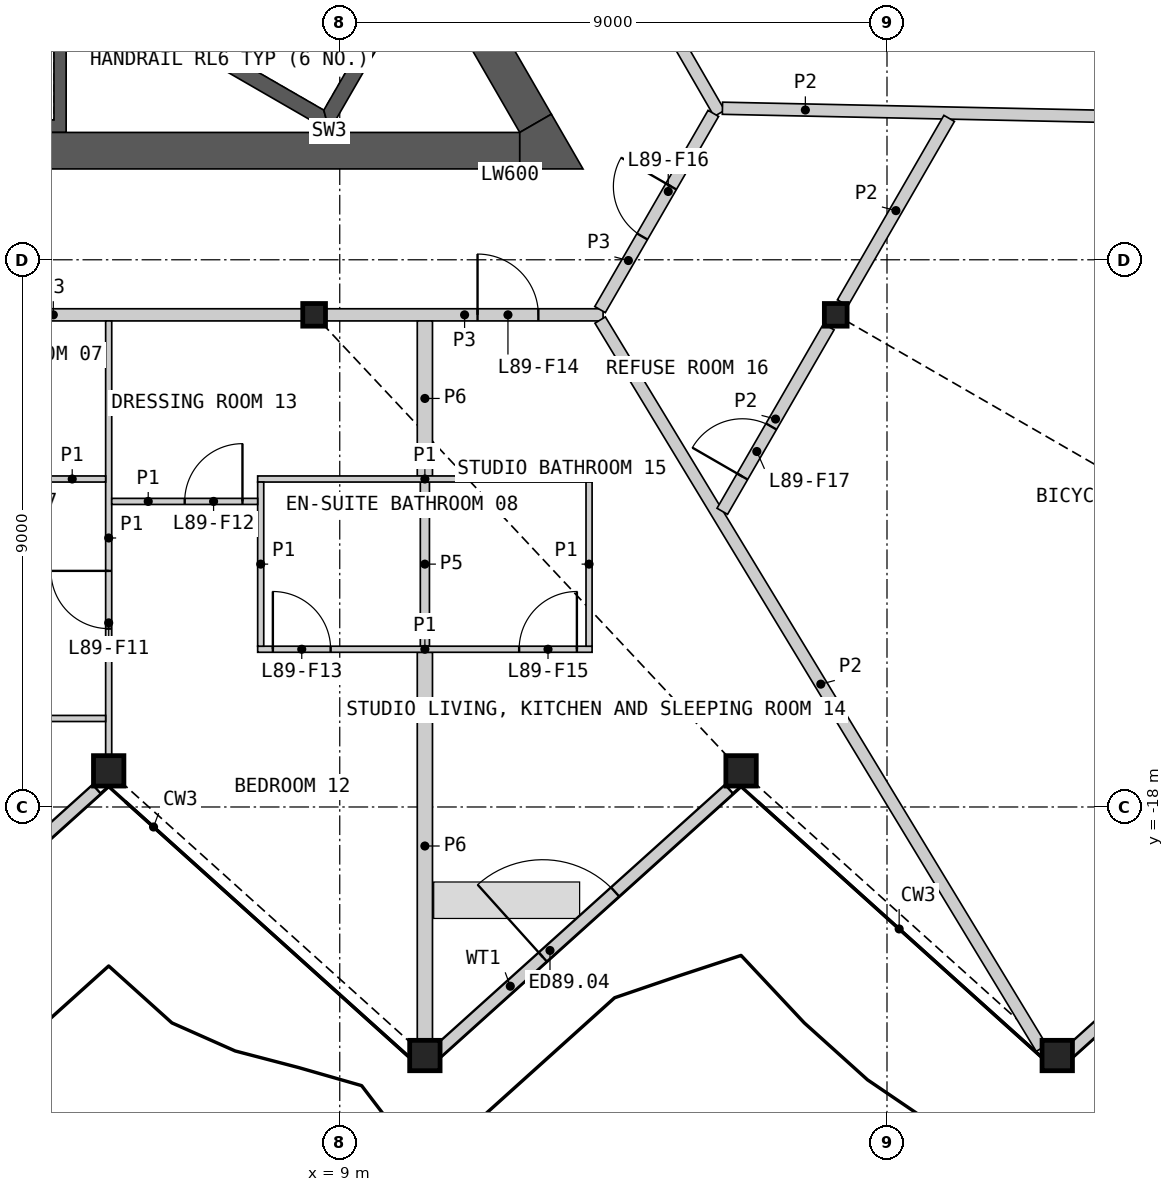
"""IFC4 building model, lengths in metres.
Left out: names, types, materials, properties, quantities, classifications, styles, units other than length and angle.
Written with IfcOpenShell. Run it as: python <this file> out.ifc"""

import sys

from ifc_helpers import new_model, si_unit, direction, frame, frame_2d, origin, origin_2d, place, context, subcontext, project, spatial, polyline, rectangle, hollow_rectangle, i_section, outline, extrude, element, fill, save


model = new_model("IFC4")
c1 = context("Model", 3, precision=1e-05, world=origin(), true_north=direction((0.0, 1.0)))
c2 = subcontext(c1, "Body", "Model", "MODEL_VIEW")
j1 = project(units=[si_unit("LENGTHUNIT", "METRE"), si_unit("PLANEANGLEUNIT", "RADIAN")], contexts=[c1])
p1 = place(None, origin())
s1 = spatial("IfcSite", under=j1, at=p1, CompositionType="ELEMENT")
p2 = place(p1, origin())
s2 = spatial("IfcBuilding", under=s1, at=p2, CompositionType="ELEMENT")
p3 = place(p2, frame((0.0, 0.0, 391.6)))
s3 = spatial("IfcBuildingStorey", under=s2, at=p3, CompositionType="ELEMENT", Elevation=391.6)
for number, where, z_axis, x_axis in (
    (1, (5.2, -17.406, 0.0), (0.0, 0.0, 1.0), (1.0, 0.0, 0.0)),
    (2, (10.4, -22.088, 0.0), (0.0, 0.0, 1.0), (1.0, 0.0, 0.0)),
    (3, (15.6, -17.406, 0.0), (0.0, 0.0, 1.0), (1.0, 0.0, 0.0)),
    (4, (20.8, -22.088, 0.0), (0.0, 0.0, 1.0), (1.0, 0.0, 0.0)),
):
    element("IfcColumn", number, at=place(p3, frame(where, z_axis=z_axis, x_axis=x_axis)), inside=s3, PredefinedType="COLUMN", context=c2, shape_type="SweptSolid", body=[
        extrude(hollow_rectangle(XDim=0.5, YDim=0.5, WallThickness=0.03, at=origin_2d()), origin(), (0.0, 0.0, 1.0), 3.4),
    ])
for number, where, z_axis, x_axis in (
    (5, (8.578, -9.906, 0.0), (0.0, 0.0, 1.0), (1.0, 0.0, 0.0)),
    (6, (17.157, -9.906, 0.0), (0.0, 0.0, 1.0), (1.0, 0.0, 0.0)),
):
    element("IfcColumn", number, at=place(p3, frame(where, z_axis=z_axis, x_axis=x_axis)), inside=s3, PredefinedType="COLUMN", context=c2, shape_type="SweptSolid", body=[
        extrude(i_section(OverallWidth=0.374, OverallDepth=0.372, WebThickness=0.016, FlangeThickness=0.026, at=origin_2d()), origin(), (0.0, 0.0, 1.0), 3.4),
    ])
p4 = place(p3, frame((0.205, -22.028, 0.0), z_axis=(0.0, 0.0, 1.0), x_axis=(0.743136196971, 0.669140189162, 0.0)))
e7 = element("IfcWall", 7, at=p4, inside=s3, PredefinedType="SOLIDWALL", context=c2, shape_type="SweptSolid", body=[
    extrude(rectangle(XDim=6.457, YDim=0.2, at=frame_2d((3.229, 0.0))), origin(), (0.0, 0.0, 1.0), 2.634),
])
p5 = place(p4, frame((2.333, 0.0, 0.0)))
e8 = element("IfcOpeningElement", 8, at=p5, cuts=e7, PredefinedType="OPENING", context=c2, shape_type="SweptSolid", body=[
    extrude(rectangle(XDim=1.6, YDim=2.25, at=frame_2d((0.8, 1.125))), frame((0.0, 0.11, 0.0), z_axis=(0.0, -1.0, 0.0), x_axis=(1.0, 0.0, 0.0)), (0.0, 0.0, 1.0), 0.22),
])
p6 = place(p3, frame((10.605, -22.028, 0.0), z_axis=(0.0, 0.0, 1.0), x_axis=(0.743153126052, 0.669121387522, 0.0)))
e9 = element("IfcWall", 9, at=p6, inside=s3, PredefinedType="SOLIDWALL", context=c2, shape_type="SweptSolid", body=[
    extrude(rectangle(XDim=6.457, YDim=0.2, at=frame_2d((3.229, 0.0))), origin(), (0.0, 0.0, 1.0), 2.634),
])
p7 = place(p6, frame((2.333, 0.0, 0.0)))
e10 = element("IfcOpeningElement", 10, at=p7, cuts=e9, PredefinedType="OPENING", context=c2, shape_type="SweptSolid", body=[
    extrude(rectangle(XDim=1.6, YDim=2.25, at=frame_2d((0.8, 1.125))), frame((0.0, 0.11, 0.0), z_axis=(0.0, -1.0, 0.0), x_axis=(1.0, 0.0, 0.0)), (0.0, 0.0, 1.0), 0.22),
])
p8 = place(p3, frame((21.005, -22.028, 0.0), z_axis=(0.0, 0.0, 1.0), x_axis=(0.743136196971, 0.669140189162, 0.0)))
e11 = element("IfcWall", 11, at=p8, inside=s3, PredefinedType="SOLIDWALL", context=c2, shape_type="SweptSolid", body=[
    extrude(rectangle(XDim=6.457, YDim=0.2, at=frame_2d((3.229, 0.0))), origin(), (0.0, 0.0, 1.0), 2.634),
])
p9 = place(p8, frame((2.333, 0.0, 0.0)))
e12 = element("IfcOpeningElement", 12, at=p9, cuts=e11, PredefinedType="OPENING", context=c2, shape_type="SweptSolid", body=[
    extrude(rectangle(XDim=1.6, YDim=2.25, at=frame_2d((0.8, 1.125))), frame((0.0, 0.11, 0.0), z_axis=(0.0, -1.0, 0.0), x_axis=(1.0, 0.0, 0.0)), (0.0, 0.0, 1.0), 0.22),
])
p10 = place(p3, origin())
e13 = element("IfcWall", 13, at=p10, inside=s3, PredefinedType="SHEAR", context=c2, shape_type="SweptSolid", body=[
    extrude(outline(polyline([(4.5, -4.4), (4.5, -6.906), (-4.5, -6.906), (-4.5, -4.4), (-4.3, -4.4), (-4.3, -6.7), (-2.3, -6.7), (-2.3, -4.4), (-2.1, -4.4), (-2.1, -6.7), (-0.1, -6.7), (-0.1, -4.4), (0.1, -4.4), (0.1, -6.7), (2.1, -6.7), (2.1, -4.4), (2.3, -4.4), (2.3, -6.7), (4.3, -6.7), (4.3, -4.4), (4.5, -4.4)])), origin(), (0.0, 0.0, 1.0), 3.1),
])
p11 = place(p3, origin())
e14 = element("IfcWall", 14, at=p11, inside=s3, PredefinedType="SHEAR", context=c2, shape_type="SweptSolid", body=[
    extrude(outline(polyline([(3.763, -3.956), (8.83, -6.881), (8.738, -6.539), (3.888, -3.739), (3.763, -3.956)])), origin(), (0.0, 0.0, 1.0), 3.1),
])
p12 = place(p3, origin())
e15 = element("IfcWall", 15, at=p12, inside=s3, PredefinedType="SHEAR", context=c2, shape_type="SweptSolid", body=[
    extrude(outline(polyline([(8.83, -6.881), (10.374, -4.206), (10.032, -4.298), (8.738, -6.539), (8.83, -6.881)])), origin(), (0.0, 0.0, 1.0), 3.1),
])
p13 = place(p3, frame((-11.961, -7.206, 0.0), z_axis=(0.0, 0.0, 1.0), x_axis=(1.0, 0.0, 0.0)))
e16 = element("IfcWall", 16, at=p13, inside=s3, PredefinedType="SHEAR", context=c2, shape_type="SweptSolid", body=[
    extrude(rectangle(XDim=23.921, YDim=0.6, at=frame_2d((11.961, 0.0))), origin(), (0.0, 0.0, 1.0), 3.1),
])
p14 = place(p3, frame((12.221, -6.756, 0.0), z_axis=(0.0, 0.0, 1.0), x_axis=(-0.50000604952, 0.866021911064, 0.0)))
e17 = element("IfcWall", 17, at=p14, inside=s3, PredefinedType="SHEAR", context=c2, shape_type="SweptSolid", body=[
    extrude(rectangle(XDim=4.869, YDim=0.6, at=frame_2d((2.434, 0.0))), origin(), (0.0, 0.0, 1.0), 3.1),
])
p15 = place(p3, origin())
e18 = element("IfcWall", 18, at=p15, inside=s3, PredefinedType="SHEAR", context=c2, shape_type="SweptSolid", body=[
    extrude(outline(polyline([(11.961, -7.506), (11.961, -6.906), (12.48, -6.606), (13.0, -7.506), (11.961, -7.506)])), origin(), (0.0, 0.0, 1.0), 3.1),
])
p16 = place(p3, frame((0.197, -9.906, 0.0), z_axis=(0.0, 0.0, 1.0), x_axis=(1.0, 0.0, 0.0)))
e19 = element("IfcWall", 19, at=p16, inside=s3, PredefinedType="PARTITIONING", context=c2, shape_type="SweptSolid", body=[
    extrude(rectangle(XDim=8.185, YDim=0.2, at=frame_2d((4.092, 0.0))), origin(), (0.0, 0.0, 1.0), 3.1),
])
p17 = place(p16, frame((1.162, 0.0, 0.0)))
e20 = element("IfcOpeningElement", 20, at=p17, cuts=e19, PredefinedType="OPENING", context=c2, shape_type="SweptSolid", body=[
    extrude(rectangle(XDim=1.0, YDim=2.1, at=frame_2d((0.5, 1.05))), frame((0.0, 0.11, 0.0), z_axis=(0.0, -1.0, 0.0), x_axis=(1.0, 0.0, 0.0)), (0.0, 0.0, 1.0), 0.22),
])
p18 = place(p3, frame((10.4, -21.828, 0.0), z_axis=(0.0, 0.0, 1.0), x_axis=(0.0, 1.0, 0.0)))
e21 = element("IfcWall", 21, at=p18, inside=s3, PredefinedType="PARTITIONING", context=c2, shape_type="SweptSolid", body=[
    extrude(rectangle(XDim=6.372, YDim=0.25, at=frame_2d((3.186, 0.0))), origin(), (0.0, 0.0, 1.0), 2.33),
])
p19 = place(p3, frame((8.775, -9.906, 0.0), z_axis=(0.0, 0.0, 1.0), x_axis=(1.0, 0.0, 0.0)))
e22 = element("IfcWall", 22, at=p19, inside=s3, PredefinedType="PARTITIONING", context=c2, shape_type="SweptSolid", body=[
    extrude(rectangle(XDim=4.555, YDim=0.2, at=frame_2d((2.278, 0.0))), origin(), (0.0, 0.0, 1.0), 3.1),
])
p20 = place(p19, frame((2.491, 0.0, 0.0)))
e23 = element("IfcOpeningElement", 23, at=p20, cuts=e22, PredefinedType="OPENING", context=c2, shape_type="SweptSolid", body=[
    extrude(rectangle(XDim=1.0, YDim=2.1, at=frame_2d((0.5, 1.05))), frame((0.0, 0.11, 0.0), z_axis=(0.0, -1.0, 0.0), x_axis=(1.0, 0.0, 0.0)), (0.0, 0.0, 1.0), 0.22),
])
p21 = place(p3, frame((12.981, -2.673, 0.0), z_axis=(0.0, 0.0, 1.0), x_axis=(0.499974648164, -0.866040040179, 0.0)))
e24 = element("IfcWall", 24, at=p21, inside=s3, PredefinedType="PARTITIONING", context=c2, shape_type="SweptSolid", body=[
    extrude(rectangle(XDim=4.525, YDim=0.2, at=frame_2d((2.263, 0.0))), origin(), (0.0, 0.0, 1.0), 3.1),
])
p22 = place(p3, frame((13.281, -9.819, 0.0), z_axis=(0.0, 0.0, 1.0), x_axis=(0.499958791762, 0.866049194065, 0.0)))
e25 = element("IfcWall", 25, at=p22, inside=s3, PredefinedType="PARTITIONING", context=c2, shape_type="SweptSolid", body=[
    extrude(rectangle(XDim=3.726, YDim=0.2, at=frame_2d((1.863, 0.0))), origin(), (0.0, 0.0, 1.0), 3.1),
])
p23 = place(p22, frame((1.388, 0.0, 0.0)))
e26 = element("IfcOpeningElement", 26, at=p23, cuts=e25, PredefinedType="OPENING", context=c2, shape_type="SweptSolid", body=[
    extrude(rectangle(XDim=0.95, YDim=2.1, at=frame_2d((0.475, 1.05))), frame((0.0, 0.11, 0.0), z_axis=(0.0, -1.0, 0.0), x_axis=(1.0, 0.0, 0.0)), (0.0, 0.0, 1.0), 0.22),
])
p24 = place(p3, frame((10.4, -12.556, 0.0), z_axis=(0.0, 0.0, 1.0), x_axis=(0.0, 1.0, 0.0)))
e27 = element("IfcWall", 27, at=p24, inside=s3, PredefinedType="PARTITIONING", context=c2, shape_type="SweptSolid", body=[
    extrude(rectangle(XDim=2.55, YDim=0.25, at=frame_2d((1.275, 0.0))), origin(), (0.0, 0.0, 1.0), 2.33),
])
p25 = place(p3, frame((13.283, -9.991, 0.0), z_axis=(0.0, 0.0, 1.0), x_axis=(0.518239121386, -0.855235764608, 0.0)))
e28 = element("IfcWall", 28, at=p25, inside=s3, PredefinedType="PARTITIONING", context=c2, shape_type="SweptSolid", body=[
    extrude(rectangle(XDim=14.004, YDim=0.2, at=frame_2d((7.002, 0.0))), origin(), (0.0, 0.0, 1.0), 2.33),
])
p26 = place(p3, frame((15.294, -6.508, 0.0), z_axis=(0.0, 0.0, 1.0), x_axis=(0.999775726416, -0.02117774467, 0.0)))
e29 = element("IfcWall", 29, at=p26, inside=s3, PredefinedType="PARTITIONING", context=c2, shape_type="SweptSolid", body=[
    extrude(rectangle(XDim=13.638, YDim=0.2, at=frame_2d((6.819, 0.0))), origin(), (0.0, 0.0, 1.0), 2.33),
])
p27 = place(p3, frame((15.291, -13.137, 0.0), z_axis=(0.0, 0.0, 1.0), x_axis=(0.500005931509, 0.866021979199, 0.0)))
e30 = element("IfcWall", 30, at=p27, inside=s3, PredefinedType="PARTITIONING", context=c2, shape_type="SweptSolid", body=[
    extrude(rectangle(XDim=3.504, YDim=0.2, at=frame_2d((1.752, 0.0))), origin(), (0.0, 0.0, 1.0), 2.33),
])
p28 = place(p27, frame((0.661, 0.0, 0.0)))
e31 = element("IfcOpeningElement", 31, at=p28, cuts=e30, PredefinedType="OPENING", context=c2, shape_type="SweptSolid", body=[
    extrude(rectangle(XDim=0.95, YDim=2.1, at=frame_2d((0.475, 1.05))), frame((0.0, 0.11, 0.0), z_axis=(0.0, -1.0, 0.0), x_axis=(1.0, 0.0, 0.0)), (0.0, 0.0, 1.0), 0.22),
])
p29 = place(p3, frame((17.271, -9.708, 0.0), z_axis=(0.0, 0.0, 1.0), x_axis=(0.499983843005, 0.866034731829, 0.0)))
e32 = element("IfcWall", 32, at=p29, inside=s3, PredefinedType="PARTITIONING", context=c2, shape_type="SweptSolid", body=[
    extrude(rectangle(XDim=3.503, YDim=0.2, at=frame_2d((1.752, 0.0))), origin(), (0.0, 0.0, 1.0), 2.33),
])
p30 = place(p3, frame((10.4, -15.356, 0.0), z_axis=(0.0, 0.0, 1.0), x_axis=(0.0, 1.0, 0.0)))
e33 = element("IfcWall", 33, at=p30, inside=s3, PredefinedType="PLUMBINGWALL", context=c2, shape_type="SweptSolid", body=[
    extrude(rectangle(XDim=2.7, YDim=0.15, at=frame_2d((1.35, 0.0))), origin(), (0.0, 0.0, 1.0), 2.33),
])
p31 = place(p3, frame((5.2, -17.146, 0.0), z_axis=(0.0, 0.0, 1.0), x_axis=(0.0, 1.0, 0.0)))
e34 = element("IfcWall", 34, at=p31, inside=s3, PredefinedType="PARTITIONING", context=c2, shape_type="SweptSolid", body=[
    extrude(rectangle(XDim=7.14, YDim=0.1, at=frame_2d((3.57, 0.0))), origin(), (0.0, 0.0, 1.0), 2.33),
])
p32 = place(p31, frame((2.079, 0.0, 0.0)))
e35 = element("IfcOpeningElement", 35, at=p32, cuts=e34, PredefinedType="OPENING", context=c2, shape_type="SweptSolid", body=[
    extrude(rectangle(XDim=0.95, YDim=2.1, at=frame_2d((0.475, 1.05))), frame((0.0, 0.06, 0.0), z_axis=(0.0, -1.0, 0.0), x_axis=(1.0, 0.0, 0.0)), (0.0, 0.0, 1.0), 0.12),
])
p33 = place(p3, frame((18.983, -1.107, 0.0), z_axis=(0.0, 0.0, 1.0), x_axis=(0.500016298831, -0.866015993445, 0.0)))
e36 = element("IfcWall", 36, at=p33, inside=s3, PredefinedType="PARTITIONING", context=c2, shape_type="SweptSolid", body=[
    extrude(rectangle(XDim=6.305, YDim=0.1, at=frame_2d((3.152, 0.0))), origin(), (0.0, 0.0, 1.0), 2.33),
])
p34 = place(p33, frame((2.475, 0.0, 0.0)))
e37 = element("IfcOpeningElement", 37, at=p34, cuts=e36, PredefinedType="OPENING", context=c2, shape_type="SweptSolid", body=[
    extrude(rectangle(XDim=0.95, YDim=2.1, at=frame_2d((0.475, 1.05))), frame((0.0, 0.06, 0.0), z_axis=(0.0, -1.0, 0.0), x_axis=(1.0, 0.0, 0.0)), (0.0, 0.0, 1.0), 0.12),
])
p35 = place(p3, frame((7.65, -12.606, 0.0), z_axis=(0.0, 0.0, 1.0), x_axis=(1.0, 0.0, 0.0)))
e38 = element("IfcWall", 38, at=p35, inside=s3, PredefinedType="PARTITIONING", context=c2, shape_type="SweptSolid", body=[
    extrude(rectangle(XDim=5.5, YDim=0.1, at=frame_2d((2.75, 0.0))), origin(), (0.0, 0.0, 1.0), 2.33),
])
p36 = place(p3, frame((7.65, -15.406, 0.0), z_axis=(0.0, 0.0, 1.0), x_axis=(1.0, 0.0, 0.0)))
e39 = element("IfcWall", 39, at=p36, inside=s3, PredefinedType="PARTITIONING", context=c2, shape_type="SweptSolid", body=[
    extrude(rectangle(XDim=5.5, YDim=0.1, at=frame_2d((2.75, 0.0))), origin(), (0.0, 0.0, 1.0), 2.33),
])
p37 = place(p36, frame((0.25, 0.0, 0.0)))
e40 = element("IfcOpeningElement", 40, at=p37, cuts=e39, PredefinedType="OPENING", context=c2, shape_type="SweptSolid", body=[
    extrude(rectangle(XDim=0.95, YDim=2.1, at=frame_2d((0.475, 1.05))), frame((0.0, 0.06, 0.0), z_axis=(0.0, -1.0, 0.0), x_axis=(1.0, 0.0, 0.0)), (0.0, 0.0, 1.0), 0.12),
])
p38 = place(p36, frame((4.3, 0.0, 0.0)))
e41 = element("IfcOpeningElement", 41, at=p38, cuts=e39, PredefinedType="OPENING", context=c2, shape_type="SweptSolid", body=[
    extrude(rectangle(XDim=0.95, YDim=2.1, at=frame_2d((0.475, 1.05))), frame((0.0, 0.06, 0.0), z_axis=(0.0, -1.0, 0.0), x_axis=(1.0, 0.0, 0.0)), (0.0, 0.0, 1.0), 0.12),
])
p39 = place(p3, frame((0.05, -16.544, 0.0), z_axis=(0.0, 0.0, 1.0), x_axis=(1.0, 0.0, 0.0)))
e42 = element("IfcWall", 42, at=p39, inside=s3, PredefinedType="PARTITIONING", context=c2, shape_type="SweptSolid", body=[
    extrude(rectangle(XDim=5.1, YDim=0.1, at=frame_2d((2.55, 0.0))), origin(), (0.0, 0.0, 1.0), 2.33),
])
p40 = place(p39, frame((2.075, 0.0, 0.0)))
e43 = element("IfcOpeningElement", 43, at=p40, cuts=e42, PredefinedType="OPENING", context=c2, shape_type="SweptSolid", body=[
    extrude(rectangle(XDim=0.95, YDim=2.1, at=frame_2d((0.475, 1.05))), frame((0.0, 0.06, 0.0), z_axis=(0.0, -1.0, 0.0), x_axis=(1.0, 0.0, 0.0)), (0.0, 0.0, 1.0), 0.12),
])
for number, where, z_axis, x_axis in (
    (44, (7.7, -15.356, 0.0), (0.0, 0.0, 1.0), (0.0, 1.0, 0.0)),
    (45, (13.1, -15.356, 0.0), (0.0, 0.0, 1.0), (0.0, 1.0, 0.0)),
):
    element("IfcWall", number, at=place(p3, frame(where, z_axis=z_axis, x_axis=x_axis)), inside=s3, PredefinedType="PARTITIONING", context=c2, shape_type="SweptSolid", body=[
        extrude(rectangle(XDim=2.7, YDim=0.1, at=frame_2d((1.35, 0.0))), origin(), (0.0, 0.0, 1.0), 2.33),
    ])
p41 = place(p3, frame((5.25, -12.974, 0.0), z_axis=(0.0, 0.0, 1.0), x_axis=(1.0, 0.0, 0.0)))
e46 = element("IfcWall", 46, at=p41, inside=s3, PredefinedType="PARTITIONING", context=c2, shape_type="SweptSolid", body=[
    extrude(rectangle(XDim=2.4, YDim=0.1, at=frame_2d((1.2, 0.0))), origin(), (0.0, 0.0, 1.0), 2.33),
])
p42 = place(p41, frame((1.2, 0.0, 0.0)))
e47 = element("IfcOpeningElement", 47, at=p42, cuts=e46, PredefinedType="OPENING", context=c2, shape_type="SweptSolid", body=[
    extrude(rectangle(XDim=0.95, YDim=2.1, at=frame_2d((0.475, 1.05))), frame((0.0, 0.06, 0.0), z_axis=(0.0, -1.0, 0.0), x_axis=(1.0, 0.0, 0.0)), (0.0, 0.0, 1.0), 0.12),
])
p43 = place(p3, frame((2.95, -12.606, 0.0), z_axis=(0.0, 0.0, 1.0), x_axis=(1.0, 0.0, 0.0)))
e48 = element("IfcWall", 48, at=p43, inside=s3, PredefinedType="PARTITIONING", context=c2, shape_type="SweptSolid", body=[
    extrude(rectangle(XDim=2.2, YDim=0.1, at=frame_2d((1.1, 0.0))), origin(), (0.0, 0.0, 1.0), 2.33),
])
p44 = place(p43, frame((0.25, 0.0, 0.0)))
e49 = element("IfcOpeningElement", 49, at=p44, cuts=e48, PredefinedType="OPENING", context=c2, shape_type="SweptSolid", body=[
    extrude(rectangle(XDim=0.95, YDim=2.1, at=frame_2d((0.475, 1.05))), frame((0.0, 0.06, 0.0), z_axis=(0.0, -1.0, 0.0), x_axis=(1.0, 0.0, 0.0)), (0.0, 0.0, 1.0), 0.12),
])
p45 = place(p7, origin())
e50 = element("IfcDoor", 50, at=p45, inside=s3, OperationType="DOUBLE_DOOR_SINGLE_SWING", PredefinedType="DOOR", context=c2, shape_type="SweptSolid", body=[
    extrude(rectangle(XDim=1.6, YDim=2.25, at=frame_2d((0.8, 1.125))), frame((0.0, 0.025, 0.0), z_axis=(0.0, -1.0, 0.0), x_axis=(1.0, 0.0, 0.0)), (0.0, 0.0, 1.0), 0.05),
])
fill(e10, e50)
p46 = place(p32, origin())
e51 = element("IfcDoor", 51, at=p46, inside=s3, OperationType="SINGLE_SWING_RIGHT", PredefinedType="DOOR", context=c2, shape_type="SweptSolid", body=[
    extrude(rectangle(XDim=0.95, YDim=2.1, at=frame_2d((0.475, 1.05))), frame((0.0, 0.025, 0.0), z_axis=(0.0, -1.0, 0.0), x_axis=(1.0, 0.0, 0.0)), (0.0, 0.0, 1.0), 0.05),
])
fill(e35, e51)
p47 = place(p42, origin())
e52 = element("IfcDoor", 52, at=p47, inside=s3, OperationType="SINGLE_SWING_RIGHT", PredefinedType="DOOR", context=c2, shape_type="SweptSolid", body=[
    extrude(rectangle(XDim=0.95, YDim=2.1, at=frame_2d((0.475, 1.05))), frame((0.0, 0.025, 0.0), z_axis=(0.0, -1.0, 0.0), x_axis=(1.0, 0.0, 0.0)), (0.0, 0.0, 1.0), 0.05),
])
fill(e47, e52)
p48 = place(p37, origin())
e53 = element("IfcDoor", 53, at=p48, inside=s3, OperationType="SINGLE_SWING_LEFT", PredefinedType="DOOR", context=c2, shape_type="SweptSolid", body=[
    extrude(rectangle(XDim=0.95, YDim=2.1, at=frame_2d((0.475, 1.05))), frame((0.0, 0.025, 0.0), z_axis=(0.0, -1.0, 0.0), x_axis=(1.0, 0.0, 0.0)), (0.0, 0.0, 1.0), 0.05),
])
fill(e40, e53)
p49 = place(p20, origin())
e54 = element("IfcDoor", 54, at=p49, inside=s3, OperationType="SINGLE_SWING_LEFT", PredefinedType="DOOR", context=c2, shape_type="SweptSolid", body=[
    extrude(rectangle(XDim=1.0, YDim=2.1, at=frame_2d((0.5, 1.05))), frame((0.0, 0.025, 0.0), z_axis=(0.0, -1.0, 0.0), x_axis=(1.0, 0.0, 0.0)), (0.0, 0.0, 1.0), 0.05),
])
fill(e23, e54)
p50 = place(p38, origin())
e55 = element("IfcDoor", 55, at=p50, inside=s3, OperationType="SINGLE_SWING_RIGHT", PredefinedType="DOOR", context=c2, shape_type="SweptSolid", body=[
    extrude(rectangle(XDim=0.95, YDim=2.1, at=frame_2d((0.475, 1.05))), frame((0.0, 0.025, 0.0), z_axis=(0.0, -1.0, 0.0), x_axis=(1.0, 0.0, 0.0)), (0.0, 0.0, 1.0), 0.05),
])
fill(e41, e55)
p51 = place(p23, origin())
e56 = element("IfcDoor", 56, at=p51, inside=s3, OperationType="SINGLE_SWING_RIGHT", PredefinedType="DOOR", context=c2, shape_type="SweptSolid", body=[
    extrude(rectangle(XDim=0.95, YDim=2.1, at=frame_2d((0.475, 1.05))), frame((0.0, 0.025, 0.0), z_axis=(0.0, -1.0, 0.0), x_axis=(1.0, 0.0, 0.0)), (0.0, 0.0, 1.0), 0.05),
])
fill(e26, e56)
p52 = place(p28, origin())
e57 = element("IfcDoor", 57, at=p52, inside=s3, OperationType="SINGLE_SWING_LEFT", PredefinedType="DOOR", context=c2, shape_type="SweptSolid", body=[
    extrude(rectangle(XDim=0.95, YDim=2.1, at=frame_2d((0.475, 1.05))), frame((0.0, 0.025, 0.0), z_axis=(0.0, -1.0, 0.0), x_axis=(1.0, 0.0, 0.0)), (0.0, 0.0, 1.0), 0.05),
])
fill(e31, e57)
save(model, sys.argv[1])
